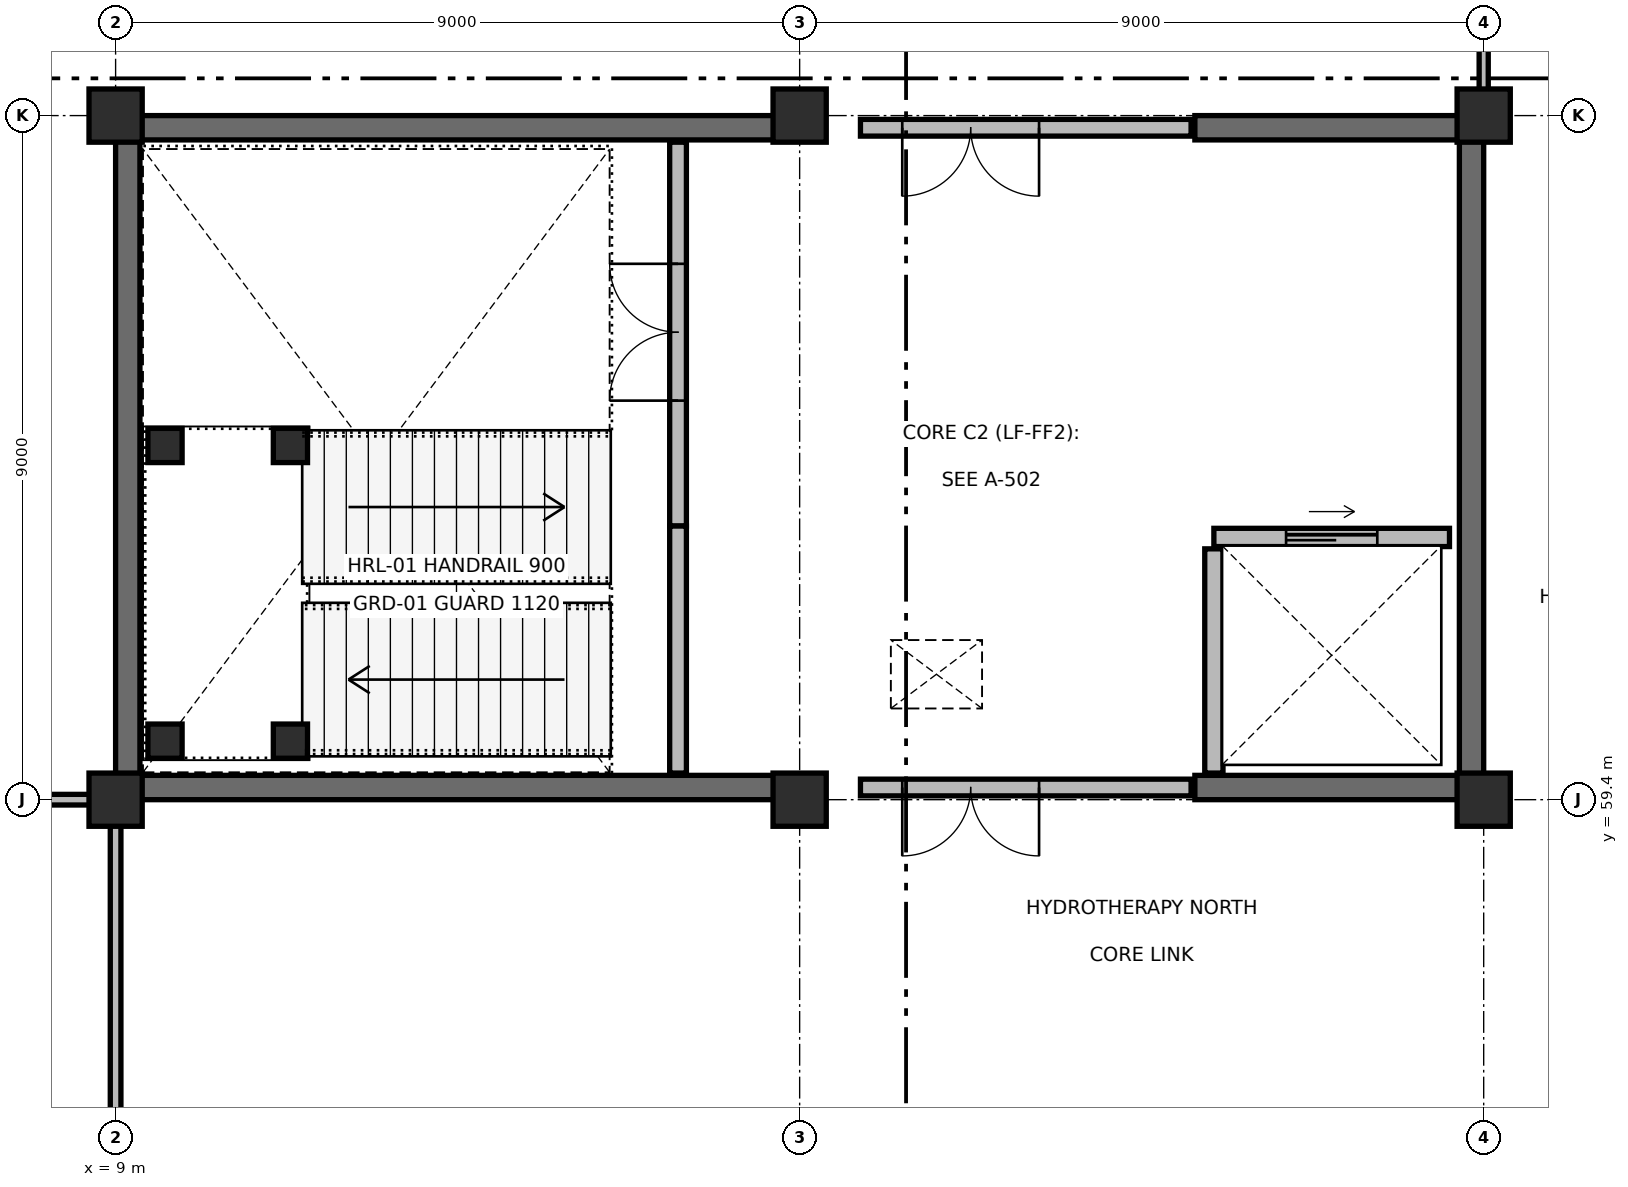
"""IFC4 building model, lengths in metres.
Left out: names, types, materials, properties, quantities, classifications, styles, units other than length and angle.
Written with IfcOpenShell. Run it as: python <this file> out.ifc"""

import sys

from ifc_helpers import new_model, si_unit, direction, frame, frame_2d, origin, origin_2d, place, context, subcontext, project, spatial, rectangle, extrude, element, fill, save


model = new_model("IFC4")
c1 = context("Model", 3, precision=1e-05, world=origin(), true_north=direction((0.0, 1.0)))
c2 = subcontext(c1, "Body", "Model", "MODEL_VIEW")
j1 = project(units=[si_unit("LENGTHUNIT", "METRE"), si_unit("PLANEANGLEUNIT", "RADIAN")], contexts=[c1])
p1 = place(None, origin())
s1 = spatial("IfcSite", under=j1, at=p1, CompositionType="ELEMENT")
p2 = place(p1, origin())
s2 = spatial("IfcBuilding", under=s1, at=p2, CompositionType="ELEMENT")
p3 = place(p2, frame((0.0, 0.0, 4.8)))
s3 = spatial("IfcBuildingStorey", under=s2, at=p3, CompositionType="ELEMENT", Elevation=4.8)
for number, where, z_axis, x_axis in (
    (1, (9.0, 59.4, 0.0), (0.0, 0.0, 1.0), (1.0, 0.0, 0.0)),
    (2, (9.0, 68.4, 0.0), (0.0, 0.0, 1.0), (1.0, 0.0, 0.0)),
    (3, (18.0, 59.4, 0.0), (0.0, 0.0, 1.0), (1.0, 0.0, 0.0)),
    (4, (18.0, 68.4, 0.0), (0.0, 0.0, 1.0), (1.0, 0.0, 0.0)),
    (5, (27.0, 59.4, 0.0), (0.0, 0.0, 1.0), (1.0, 0.0, 0.0)),
    (6, (27.0, 68.4, 0.0), (0.0, 0.0, 1.0), (1.0, 0.0, 0.0)),
):
    element("IfcColumn", number, at=place(p3, frame(where, z_axis=z_axis, x_axis=x_axis)), inside=s3, PredefinedType="COLUMN", context=c2, shape_type="SweptSolid", body=[
        extrude(rectangle(XDim=0.7, YDim=0.7, at=origin_2d()), origin(), (0.0, 0.0, 1.0), 4.8),
    ])
p4 = place(p3, frame((9.0, 59.56, 0.0), z_axis=(0.0, 0.0, 1.0), x_axis=(1.0, 0.0, 0.0)))
e7 = element("IfcWall", 7, at=p4, inside=s3, PredefinedType="SHEAR", context=c2, shape_type="SweptSolid", body=[
    extrude(rectangle(XDim=9.2, YDim=0.32, at=frame_2d((4.6, 0.0))), origin(), (0.0, 0.0, 1.0), 4.8),
])
p5 = place(p3, frame((23.2, 59.56, 0.0), z_axis=(0.0, 0.0, 1.0), x_axis=(1.0, 0.0, 0.0)))
e8 = element("IfcWall", 8, at=p5, inside=s3, PredefinedType="SHEAR", context=c2, shape_type="SweptSolid", body=[
    extrude(rectangle(XDim=3.8, YDim=0.32, at=frame_2d((1.9, 0.0))), origin(), (0.0, 0.0, 1.0), 4.8),
])
p6 = place(p3, frame((9.0, 68.24, 0.0), z_axis=(0.0, 0.0, 1.0), x_axis=(1.0, 0.0, 0.0)))
e9 = element("IfcWall", 9, at=p6, inside=s3, PredefinedType="SHEAR", context=c2, shape_type="SweptSolid", body=[
    extrude(rectangle(XDim=9.2, YDim=0.32, at=frame_2d((4.6, 0.0))), origin(), (0.0, 0.0, 1.0), 4.8),
])
p7 = place(p3, frame((23.2, 68.24, 0.0), z_axis=(0.0, 0.0, 1.0), x_axis=(1.0, 0.0, 0.0)))
e10 = element("IfcWall", 10, at=p7, inside=s3, PredefinedType="SHEAR", context=c2, shape_type="SweptSolid", body=[
    extrude(rectangle(XDim=3.8, YDim=0.32, at=frame_2d((1.9, 0.0))), origin(), (0.0, 0.0, 1.0), 4.8),
])
for number, where, z_axis, x_axis in (
    (11, (9.16, 59.72, 0.0), (0.0, 0.0, 1.0), (0.0, 1.0, 0.0)),
    (12, (26.84, 59.72, 0.0), (0.0, 0.0, 1.0), (0.0, 1.0, 0.0)),
):
    element("IfcWall", number, at=place(p3, frame(where, z_axis=z_axis, x_axis=x_axis)), inside=s3, PredefinedType="SHEAR", context=c2, shape_type="SweptSolid", body=[
        extrude(rectangle(XDim=8.36, YDim=0.32, at=frame_2d((4.18, 0.0))), origin(), (0.0, 0.0, 1.0), 4.8),
    ])
p8 = place(p3, frame((16.4, 68.05, 0.0), z_axis=(0.0, 0.0, 1.0), x_axis=(0.0, -1.0, 0.0)))
e13 = element("IfcWall", 13, at=p8, inside=s3, PredefinedType="PARTITIONING", context=c2, shape_type="SweptSolid", body=[
    extrude(rectangle(XDim=5.05, YDim=0.22, at=frame_2d((2.525, 0.0))), origin(), (0.0, 0.0, 1.0), 3.875),
])
p9 = place(p8, frame((1.6, 0.0, 0.0)))
e14 = element("IfcOpeningElement", 14, at=p9, cuts=e13, PredefinedType="OPENING", context=c2, shape_type="SweptSolid", body=[
    extrude(rectangle(XDim=1.8, YDim=2.2, at=frame_2d((0.9, 1.1))), frame((0.0, 0.12, 0.0), z_axis=(0.0, -1.0, 0.0), x_axis=(1.0, 0.0, 0.0)), (0.0, 0.0, 1.0), 0.24),
])
p10 = place(p3, frame((16.4, 59.75, 0.0), z_axis=(0.0, 0.0, 1.0), x_axis=(0.0, 1.0, 0.0)))
e15 = element("IfcWall", 15, at=p10, inside=s3, PredefinedType="PARTITIONING", context=c2, shape_type="SweptSolid", body=[
    extrude(rectangle(XDim=3.25, YDim=0.22, at=frame_2d((1.625, 0.0))), origin(), (0.0, 0.0, 1.0), 3.875),
])
p11 = place(p3, frame((23.45, 62.85, 0.0), z_axis=(0.0, 0.0, 1.0), x_axis=(1.0, 0.0, 0.0)))
e16 = element("IfcWall", 16, at=p11, inside=s3, PredefinedType="SOLIDWALL", context=c2, shape_type="SweptSolid", body=[
    extrude(rectangle(XDim=3.1, YDim=0.24, at=frame_2d((1.55, 0.0))), origin(), (0.0, 0.0, 1.0), 4.505),
])
p12 = place(p11, frame((0.95, 0.0, 0.0)))
e17 = element("IfcOpeningElement", 17, at=p12, cuts=e16, PredefinedType="OPENING", context=c2, shape_type="SweptSolid", body=[
    extrude(rectangle(XDim=1.2, YDim=2.2, at=frame_2d((0.6, 1.1))), frame((0.0, 0.13, 0.0), z_axis=(0.0, -1.0, 0.0), x_axis=(1.0, 0.0, 0.0)), (0.0, 0.0, 1.0), 0.26),
])
p13 = place(p3, frame((23.45, 59.75, 0.0), z_axis=(0.0, 0.0, 1.0), x_axis=(0.0, 1.0, 0.0)))
e18 = element("IfcWall", 18, at=p13, inside=s3, PredefinedType="SOLIDWALL", context=c2, shape_type="SweptSolid", body=[
    extrude(rectangle(XDim=2.95, YDim=0.24, at=frame_2d((1.475, 0.0))), origin(), (0.0, 0.0, 1.0), 3.875),
])
p14 = place(p3, frame((18.8, 59.56, 0.0), z_axis=(0.0, 0.0, 1.0), x_axis=(1.0, 0.0, 0.0)))
e19 = element("IfcWall", 19, at=p14, inside=s3, PredefinedType="PARTITIONING", context=c2, shape_type="SweptSolid", body=[
    extrude(rectangle(XDim=4.35, YDim=0.22, at=frame_2d((2.175, 0.0))), origin(), (0.0, 0.0, 1.0), 3.875),
])
p15 = place(p14, frame((0.55, 0.0, 0.0)))
e20 = element("IfcOpeningElement", 20, at=p15, cuts=e19, PredefinedType="OPENING", context=c2, shape_type="SweptSolid", body=[
    extrude(rectangle(XDim=1.8, YDim=2.2, at=frame_2d((0.9, 1.1))), frame((0.0, 0.12, 0.0), z_axis=(0.0, -1.0, 0.0), x_axis=(1.0, 0.0, 0.0)), (0.0, 0.0, 1.0), 0.24),
])
p16 = place(p3, frame((18.8, 68.24, 0.0), z_axis=(0.0, 0.0, 1.0), x_axis=(1.0, 0.0, 0.0)))
e21 = element("IfcWall", 21, at=p16, inside=s3, PredefinedType="PARTITIONING", context=c2, shape_type="SweptSolid", body=[
    extrude(rectangle(XDim=4.35, YDim=0.22, at=frame_2d((2.175, 0.0))), origin(), (0.0, 0.0, 1.0), 3.875),
])
p17 = place(p16, frame((0.55, 0.0, 0.0)))
e22 = element("IfcOpeningElement", 22, at=p17, cuts=e21, PredefinedType="OPENING", context=c2, shape_type="SweptSolid", body=[
    extrude(rectangle(XDim=1.8, YDim=2.2, at=frame_2d((0.9, 1.1))), frame((0.0, 0.12, 0.0), z_axis=(0.0, -1.0, 0.0), x_axis=(1.0, 0.0, 0.0)), (0.0, 0.0, 1.0), 0.24),
])
p18 = place(p3, frame((9.0, 28.8, 0.0), z_axis=(0.0, 0.0, 1.0), x_axis=(0.0, 1.0, 0.0)))
e23 = element("IfcWall", 23, at=p18, inside=s3, PredefinedType="PARTITIONING", context=c2, shape_type="SweptSolid", body=[
    extrude(rectangle(XDim=30.6, YDim=0.14, at=frame_2d((15.3, 0.0))), origin(), (0.0, 0.0, 1.0), 3.775),
])
p19 = place(p3, frame((0.0, 59.4, 0.0), z_axis=(0.0, 0.0, 1.0), x_axis=(1.0, 0.0, 0.0)))
e24 = element("IfcWall", 24, at=p19, inside=s3, PredefinedType="PARTITIONING", context=c2, shape_type="SweptSolid", body=[
    extrude(rectangle(XDim=9.0, YDim=0.14, at=frame_2d((4.5, 0.0))), origin(), (0.0, 0.0, 1.0), 3.775),
])
p20 = place(p19, frame((4.025, 0.0, 0.0)))
e25 = element("IfcOpeningElement", 25, at=p20, cuts=e24, PredefinedType="OPENING", context=c2, shape_type="SweptSolid", body=[
    extrude(rectangle(XDim=0.95, YDim=2.1, at=frame_2d((0.475, 1.05))), frame((0.0, 0.08, 0.0), z_axis=(0.0, -1.0, 0.0), x_axis=(1.0, 0.0, 0.0)), (0.0, 0.0, 1.0), 0.16),
])
p21 = place(p3, frame((27.0, 68.4, 0.0), z_axis=(0.0, 0.0, 1.0), x_axis=(0.0, 1.0, 0.0)))
e26 = element("IfcWall", 26, at=p21, inside=s3, PredefinedType="PARTITIONING", context=c2, shape_type="SweptSolid", body=[
    extrude(rectangle(XDim=23.4, YDim=0.12, at=frame_2d((11.7, 0.0))), origin(), (0.0, 0.0, 1.0), 3.775),
])
p22 = place(p21, frame((4.698, 0.0, 0.0)))
e27 = element("IfcOpeningElement", 27, at=p22, cuts=e26, PredefinedType="OPENING", context=c2, shape_type="SweptSolid", body=[
    extrude(rectangle(XDim=0.9, YDim=2.1, at=frame_2d((0.45, 1.05))), frame((0.0, 0.07, 0.0), z_axis=(0.0, -1.0, 0.0), x_axis=(1.0, 0.0, 0.0)), (0.0, 0.0, 1.0), 0.14),
])
for number, where, z_axis, x_axis in (
    (28, (9.65, 60.17, 0.0), (0.0, 0.0, 1.0), (1.0, 0.0, 0.0)),
    (29, (11.3, 60.17, 0.0), (0.0, 0.0, 1.0), (1.0, 0.0, 0.0)),
    (30, (9.65, 64.06, 0.0), (0.0, 0.0, 1.0), (1.0, 0.0, 0.0)),
    (31, (11.3, 64.06, 0.0), (0.0, 0.0, 1.0), (1.0, 0.0, 0.0)),
):
    element("IfcColumn", number, at=place(p3, frame(where, z_axis=z_axis, x_axis=x_axis)), inside=s3, PredefinedType="COLUMN", context=c2, shape_type="SweptSolid", body=[
        extrude(rectangle(XDim=0.45, YDim=0.45, at=origin_2d()), origin(), (0.0, 0.0, 1.0), 4.8),
    ])
p23 = place(p9, origin())
e32 = element("IfcDoor", 32, at=p23, inside=s3, OperationType="DOUBLE_DOOR_SINGLE_SWING", PredefinedType="DOOR", context=c2, shape_type="SweptSolid", body=[
    extrude(rectangle(XDim=1.8, YDim=2.2, at=frame_2d((0.9, 1.1))), frame((0.0, 0.025, 0.0), z_axis=(0.0, -1.0, 0.0), x_axis=(1.0, 0.0, 0.0)), (0.0, 0.0, 1.0), 0.05),
])
fill(e14, e32)
p24 = place(p12, origin())
e33 = element("IfcDoor", 33, at=p24, inside=s3, OperationType="DOUBLE_DOOR_SLIDING", PredefinedType="DOOR", context=c2, shape_type="SweptSolid", body=[
    extrude(rectangle(XDim=1.2, YDim=2.2, at=frame_2d((0.6, 1.1))), frame((0.0, 0.025, 0.0), z_axis=(0.0, -1.0, 0.0), x_axis=(1.0, 0.0, 0.0)), (0.0, 0.0, 1.0), 0.05),
])
fill(e17, e33)
p25 = place(p15, origin())
e34 = element("IfcDoor", 34, at=p25, inside=s3, OperationType="DOUBLE_DOOR_SINGLE_SWING", PredefinedType="DOOR", context=c2, shape_type="SweptSolid", body=[
    extrude(rectangle(XDim=1.8, YDim=2.2, at=frame_2d((0.9, 1.1))), frame((0.0, 0.025, 0.0), z_axis=(0.0, -1.0, 0.0), x_axis=(1.0, 0.0, 0.0)), (0.0, 0.0, 1.0), 0.05),
])
fill(e20, e34)
p26 = place(p17, origin())
e35 = element("IfcDoor", 35, at=p26, inside=s3, OperationType="DOUBLE_DOOR_SINGLE_SWING", PredefinedType="DOOR", context=c2, shape_type="SweptSolid", body=[
    extrude(rectangle(XDim=1.8, YDim=2.2, at=frame_2d((0.9, 1.1))), frame((0.0, 0.025, 0.0), z_axis=(0.0, -1.0, 0.0), x_axis=(1.0, 0.0, 0.0)), (0.0, 0.0, 1.0), 0.05),
])
fill(e22, e35)
save(model, sys.argv[1])
